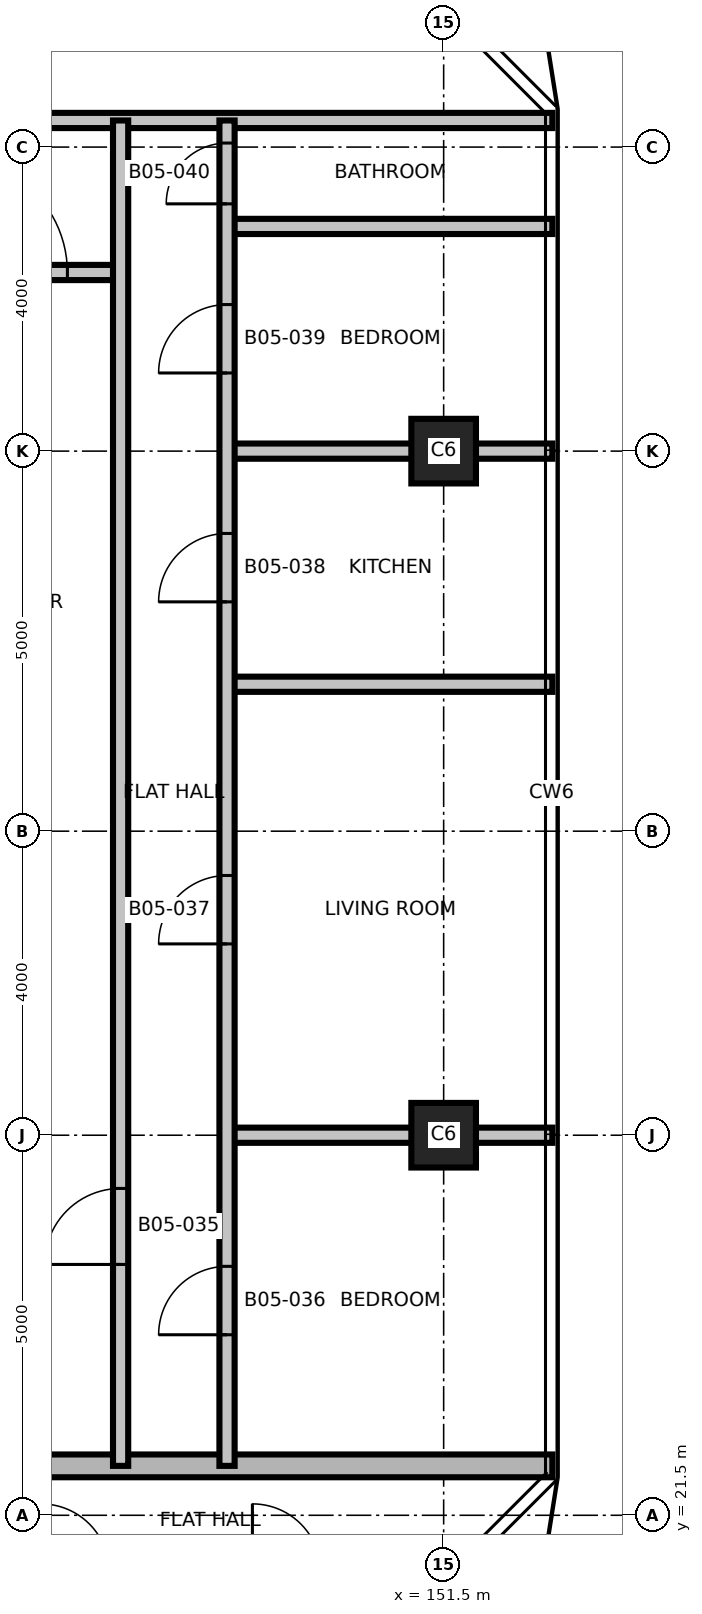
"""IFC4 building model, lengths in metres.
Left out: names, types, materials, properties, quantities, classifications, styles, units other than length and angle.
Written with IfcOpenShell. Run it as: python <this file> out.ifc"""

import sys

from ifc_helpers import new_model, si_unit, direction, frame, frame_2d, origin, origin_2d, place, context, subcontext, project, spatial, rectangle, extrude, element, fill, save


model = new_model("IFC4")
c1 = context("Model", 3, precision=1e-05, world=origin(), true_north=direction((0.0, 1.0)))
c2 = subcontext(c1, "Body", "Model", "MODEL_VIEW")
j1 = project(units=[si_unit("LENGTHUNIT", "METRE"), si_unit("PLANEANGLEUNIT", "RADIAN")], contexts=[c1])
p1 = place(None, origin())
s1 = spatial("IfcSite", under=j1, at=p1, CompositionType="ELEMENT")
p2 = place(p1, origin())
s2 = spatial("IfcBuilding", under=s1, at=p2, CompositionType="ELEMENT")
p3 = place(p2, frame((0.0, 0.0, 70.5)))
s3 = spatial("IfcBuildingStorey", under=s2, at=p3, CompositionType="ELEMENT", Elevation=70.5)
for number, where, z_axis, x_axis in (
    (1, (151.5, 26.5, 0.0), (0.0, 0.0, 1.0), (1.0, 0.0, 0.0)),
    (2, (151.5, 35.5, 0.0), (0.0, 0.0, 1.0), (1.0, 0.0, 0.0)),
):
    element("IfcColumn", number, at=place(p3, frame(where, z_axis=z_axis, x_axis=x_axis)), inside=s3, PredefinedType="COLUMN", context=c2, shape_type="SweptSolid", body=[
        extrude(rectangle(XDim=0.85, YDim=0.85, at=origin_2d()), origin(), (0.0, 0.0, 1.0), 3.7),
    ])
p4 = place(p3, frame((120.07, 22.15, 0.0), z_axis=(0.0, 0.0, 1.0), x_axis=(1.0, 0.0, 0.0)))
e3 = element("IfcWall", 3, at=p4, inside=s3, PredefinedType="SHEAR", context=c2, shape_type="SweptSolid", body=[
    extrude(rectangle(XDim=32.86, YDim=0.3, at=frame_2d((16.43, 0.0))), origin(), (0.0, 0.0, 1.0), 3.4),
])
p5 = place(p4, frame((22.68, 0.0, 0.0)))
e4 = element("IfcOpeningElement", 4, at=p5, cuts=e3, PredefinedType="OPENING", context=c2, shape_type="SweptSolid", body=[
    extrude(rectangle(XDim=1.0, YDim=2.1, at=frame_2d((0.5, 1.05))), frame((0.0, 0.16, 0.0), z_axis=(0.0, -1.0, 0.0), x_axis=(1.0, 0.0, 0.0)), (0.0, 0.0, 1.0), 0.32),
])
p6 = place(p4, frame((11.03, 0.0, 0.0)))
e5 = element("IfcOpeningElement", 5, at=p6, cuts=e3, PredefinedType="OPENING", context=c2, shape_type="SweptSolid", body=[
    extrude(rectangle(XDim=1.0, YDim=2.1, at=frame_2d((0.5, 1.05))), frame((0.0, 0.16, 0.0), z_axis=(0.0, -1.0, 0.0), x_axis=(1.0, 0.0, 0.0)), (0.0, 0.0, 1.0), 0.32),
])
p7 = place(p4, frame((24.58, 0.0, 0.0)))
e6 = element("IfcOpeningElement", 6, at=p7, cuts=e3, PredefinedType="OPENING", context=c2, shape_type="SweptSolid", body=[
    extrude(rectangle(XDim=1.0, YDim=2.1, at=frame_2d((0.5, 1.05))), frame((0.0, 0.16, 0.0), z_axis=(0.0, -1.0, 0.0), x_axis=(1.0, 0.0, 0.0)), (0.0, 0.0, 1.0), 0.32),
])
p8 = place(p4, frame((16.68, 0.0, 0.0)))
e7 = element("IfcOpeningElement", 7, at=p8, cuts=e3, PredefinedType="OPENING", context=c2, shape_type="SweptSolid", body=[
    extrude(rectangle(XDim=0.9, YDim=2.1, at=frame_2d((0.45, 1.05))), frame((0.0, 0.16, 0.0), z_axis=(0.0, -1.0, 0.0), x_axis=(1.0, 0.0, 0.0)), (0.0, 0.0, 1.0), 0.32),
])
for number, where, z_axis, x_axis in (
    (8, (148.65, 26.5, 0.0), (0.0, 0.0, 1.0), (1.0, 0.0, 0.0)),
    (9, (148.65, 32.433, 0.0), (0.0, 0.0, 1.0), (1.0, 0.0, 0.0)),
    (10, (148.65, 35.5, 0.0), (0.0, 0.0, 1.0), (1.0, 0.0, 0.0)),
):
    element("IfcWall", number, at=place(p3, frame(where, z_axis=z_axis, x_axis=x_axis)), inside=s3, PredefinedType="PARTITIONING", context=c2, shape_type="SweptSolid", body=[
        extrude(rectangle(XDim=4.28, YDim=0.2, at=frame_2d((2.14, 0.0))), origin(), (0.0, 0.0, 1.0), 3.4),
    ])
p9 = place(p3, frame((144.02, 37.85, 0.0), z_axis=(0.0, 0.0, 1.0), x_axis=(1.0, 0.0, 0.0)))
e11 = element("IfcWall", 11, at=p9, inside=s3, PredefinedType="PARTITIONING", context=c2, shape_type="SweptSolid", body=[
    extrude(rectangle(XDim=3.23, YDim=0.2, at=frame_2d((1.615, 0.0))), origin(), (0.0, 0.0, 1.0), 3.4),
])
p10 = place(p9, frame((1.03, 0.0, 0.0)))
e12 = element("IfcOpeningElement", 12, at=p10, cuts=e11, PredefinedType="OPENING", context=c2, shape_type="SweptSolid", body=[
    extrude(rectangle(XDim=1.5, YDim=2.1, at=frame_2d((0.75, 1.05))), frame((0.0, 0.11, 0.0), z_axis=(0.0, -1.0, 0.0), x_axis=(1.0, 0.0, 0.0)), (0.0, 0.0, 1.0), 0.22),
])
p11 = place(p3, frame((148.65, 38.456, 0.0), z_axis=(0.0, 0.0, 1.0), x_axis=(1.0, 0.0, 0.0)))
e13 = element("IfcWall", 13, at=p11, inside=s3, PredefinedType="PARTITIONING", context=c2, shape_type="SweptSolid", body=[
    extrude(rectangle(XDim=4.28, YDim=0.2, at=frame_2d((2.14, 0.0))), origin(), (0.0, 0.0, 1.0), 3.4),
])
p12 = place(p3, frame((120.07, 39.85, 0.0), z_axis=(0.0, 0.0, 1.0), x_axis=(1.0, 0.0, 0.0)))
e14 = element("IfcWall", 14, at=p12, inside=s3, PredefinedType="PARTITIONING", context=c2, shape_type="SweptSolid", body=[
    extrude(rectangle(XDim=32.86, YDim=0.2, at=frame_2d((16.43, 0.0))), origin(), (0.0, 0.0, 1.0), 3.4),
])
p13 = place(p12, frame((11.03, 0.0, 0.0)))
e15 = element("IfcOpeningElement", 15, at=p13, cuts=e14, PredefinedType="OPENING", context=c2, shape_type="SweptSolid", body=[
    extrude(rectangle(XDim=1.0, YDim=2.1, at=frame_2d((0.5, 1.05))), frame((0.0, 0.11, 0.0), z_axis=(0.0, -1.0, 0.0), x_axis=(1.0, 0.0, 0.0)), (0.0, 0.0, 1.0), 0.22),
])
p14 = place(p12, frame((20.83, 0.0, 0.0)))
e16 = element("IfcOpeningElement", 16, at=p14, cuts=e14, PredefinedType="OPENING", context=c2, shape_type="SweptSolid", body=[
    extrude(rectangle(XDim=1.0, YDim=2.1, at=frame_2d((0.5, 1.05))), frame((0.0, 0.11, 0.0), z_axis=(0.0, -1.0, 0.0), x_axis=(1.0, 0.0, 0.0)), (0.0, 0.0, 1.0), 0.22),
])
p15 = place(p3, frame((147.25, 22.15, 0.0), z_axis=(0.0, 0.0, 1.0), x_axis=(0.0, 1.0, 0.0)))
e17 = element("IfcWall", 17, at=p15, inside=s3, PredefinedType="PARTITIONING", context=c2, shape_type="SweptSolid", body=[
    extrude(rectangle(XDim=17.7, YDim=0.2, at=frame_2d((8.85, 0.0))), origin(), (0.0, 0.0, 1.0), 3.4),
])
p16 = place(p15, frame((2.65, 0.0, 0.0)))
e18 = element("IfcOpeningElement", 18, at=p16, cuts=e17, PredefinedType="OPENING", context=c2, shape_type="SweptSolid", body=[
    extrude(rectangle(XDim=1.0, YDim=2.1, at=frame_2d((0.5, 1.05))), frame((0.0, 0.11, 0.0), z_axis=(0.0, -1.0, 0.0), x_axis=(1.0, 0.0, 0.0)), (0.0, 0.0, 1.0), 0.22),
])
p17 = place(p3, frame((148.65, 22.15, 0.0), z_axis=(0.0, 0.0, 1.0), x_axis=(0.0, 1.0, 0.0)))
e19 = element("IfcWall", 19, at=p17, inside=s3, PredefinedType="PARTITIONING", context=c2, shape_type="SweptSolid", body=[
    extrude(rectangle(XDim=17.7, YDim=0.2, at=frame_2d((8.85, 0.0))), origin(), (0.0, 0.0, 1.0), 3.4),
])
p18 = place(p17, frame((1.725, 0.0, 0.0)))
e20 = element("IfcOpeningElement", 20, at=p18, cuts=e19, PredefinedType="OPENING", context=c2, shape_type="SweptSolid", body=[
    extrude(rectangle(XDim=0.9, YDim=2.1, at=frame_2d((0.45, 1.05))), frame((0.0, 0.11, 0.0), z_axis=(0.0, -1.0, 0.0), x_axis=(1.0, 0.0, 0.0)), (0.0, 0.0, 1.0), 0.22),
])
p19 = place(p17, frame((6.867, 0.0, 0.0)))
e21 = element("IfcOpeningElement", 21, at=p19, cuts=e19, PredefinedType="OPENING", context=c2, shape_type="SweptSolid", body=[
    extrude(rectangle(XDim=0.9, YDim=2.1, at=frame_2d((0.45, 1.05))), frame((0.0, 0.11, 0.0), z_axis=(0.0, -1.0, 0.0), x_axis=(1.0, 0.0, 0.0)), (0.0, 0.0, 1.0), 0.22),
])
p20 = place(p17, frame((11.367, 0.0, 0.0)))
e22 = element("IfcOpeningElement", 22, at=p20, cuts=e19, PredefinedType="OPENING", context=c2, shape_type="SweptSolid", body=[
    extrude(rectangle(XDim=0.9, YDim=2.1, at=frame_2d((0.45, 1.05))), frame((0.0, 0.11, 0.0), z_axis=(0.0, -1.0, 0.0), x_axis=(1.0, 0.0, 0.0)), (0.0, 0.0, 1.0), 0.22),
])
p21 = place(p17, frame((14.378, 0.0, 0.0)))
e23 = element("IfcOpeningElement", 23, at=p21, cuts=e19, PredefinedType="OPENING", context=c2, shape_type="SweptSolid", body=[
    extrude(rectangle(XDim=0.9, YDim=2.1, at=frame_2d((0.45, 1.05))), frame((0.0, 0.11, 0.0), z_axis=(0.0, -1.0, 0.0), x_axis=(1.0, 0.0, 0.0)), (0.0, 0.0, 1.0), 0.22),
])
p22 = place(p17, frame((16.603, 0.0, 0.0)))
e24 = element("IfcOpeningElement", 24, at=p22, cuts=e19, PredefinedType="OPENING", context=c2, shape_type="SweptSolid", body=[
    extrude(rectangle(XDim=0.8, YDim=2.1, at=frame_2d((0.4, 1.05))), frame((0.0, 0.11, 0.0), z_axis=(0.0, -1.0, 0.0), x_axis=(1.0, 0.0, 0.0)), (0.0, 0.0, 1.0), 0.22),
])
p23 = place(p10, origin())
e25 = element("IfcDoor", 25, at=p23, inside=s3, OperationType="SINGLE_SWING_LEFT", PredefinedType="DOOR", context=c2, shape_type="SweptSolid", body=[
    extrude(rectangle(XDim=1.5, YDim=2.1, at=frame_2d((0.75, 1.05))), frame((0.0, 0.025, 0.0), z_axis=(0.0, -1.0, 0.0), x_axis=(1.0, 0.0, 0.0)), (0.0, 0.0, 1.0), 0.05),
])
fill(e12, e25)
p24 = place(p16, origin())
e26 = element("IfcDoor", 26, at=p24, inside=s3, OperationType="SINGLE_SWING_LEFT", PredefinedType="DOOR", context=c2, shape_type="SweptSolid", body=[
    extrude(rectangle(XDim=1.0, YDim=2.1, at=frame_2d((0.5, 1.05))), frame((0.0, 0.025, 0.0), z_axis=(0.0, -1.0, 0.0), x_axis=(1.0, 0.0, 0.0)), (0.0, 0.0, 1.0), 0.05),
])
fill(e18, e26)
p25 = place(p18, origin())
e27 = element("IfcDoor", 27, at=p25, inside=s3, OperationType="SINGLE_SWING_RIGHT", PredefinedType="DOOR", context=c2, shape_type="SweptSolid", body=[
    extrude(rectangle(XDim=0.9, YDim=2.1, at=frame_2d((0.45, 1.05))), frame((0.0, 0.025, 0.0), z_axis=(0.0, -1.0, 0.0), x_axis=(1.0, 0.0, 0.0)), (0.0, 0.0, 1.0), 0.05),
])
fill(e20, e27)
p26 = place(p19, origin())
e28 = element("IfcDoor", 28, at=p26, inside=s3, OperationType="SINGLE_SWING_LEFT", PredefinedType="DOOR", context=c2, shape_type="SweptSolid", body=[
    extrude(rectangle(XDim=0.9, YDim=2.1, at=frame_2d((0.45, 1.05))), frame((0.0, 0.025, 0.0), z_axis=(0.0, -1.0, 0.0), x_axis=(1.0, 0.0, 0.0)), (0.0, 0.0, 1.0), 0.05),
])
fill(e21, e28)
p27 = place(p20, origin())
e29 = element("IfcDoor", 29, at=p27, inside=s3, OperationType="SINGLE_SWING_RIGHT", PredefinedType="DOOR", context=c2, shape_type="SweptSolid", body=[
    extrude(rectangle(XDim=0.9, YDim=2.1, at=frame_2d((0.45, 1.05))), frame((0.0, 0.025, 0.0), z_axis=(0.0, -1.0, 0.0), x_axis=(1.0, 0.0, 0.0)), (0.0, 0.0, 1.0), 0.05),
])
fill(e22, e29)
p28 = place(p21, origin())
e30 = element("IfcDoor", 30, at=p28, inside=s3, OperationType="SINGLE_SWING_LEFT", PredefinedType="DOOR", context=c2, shape_type="SweptSolid", body=[
    extrude(rectangle(XDim=0.9, YDim=2.1, at=frame_2d((0.45, 1.05))), frame((0.0, 0.025, 0.0), z_axis=(0.0, -1.0, 0.0), x_axis=(1.0, 0.0, 0.0)), (0.0, 0.0, 1.0), 0.05),
])
fill(e23, e30)
p29 = place(p22, origin())
e31 = element("IfcDoor", 31, at=p29, inside=s3, OperationType="SINGLE_SWING_RIGHT", PredefinedType="DOOR", context=c2, shape_type="SweptSolid", body=[
    extrude(rectangle(XDim=0.8, YDim=2.1, at=frame_2d((0.4, 1.05))), frame((0.0, 0.025, 0.0), z_axis=(0.0, -1.0, 0.0), x_axis=(1.0, 0.0, 0.0)), (0.0, 0.0, 1.0), 0.05),
])
fill(e24, e31)
save(model, sys.argv[1])
